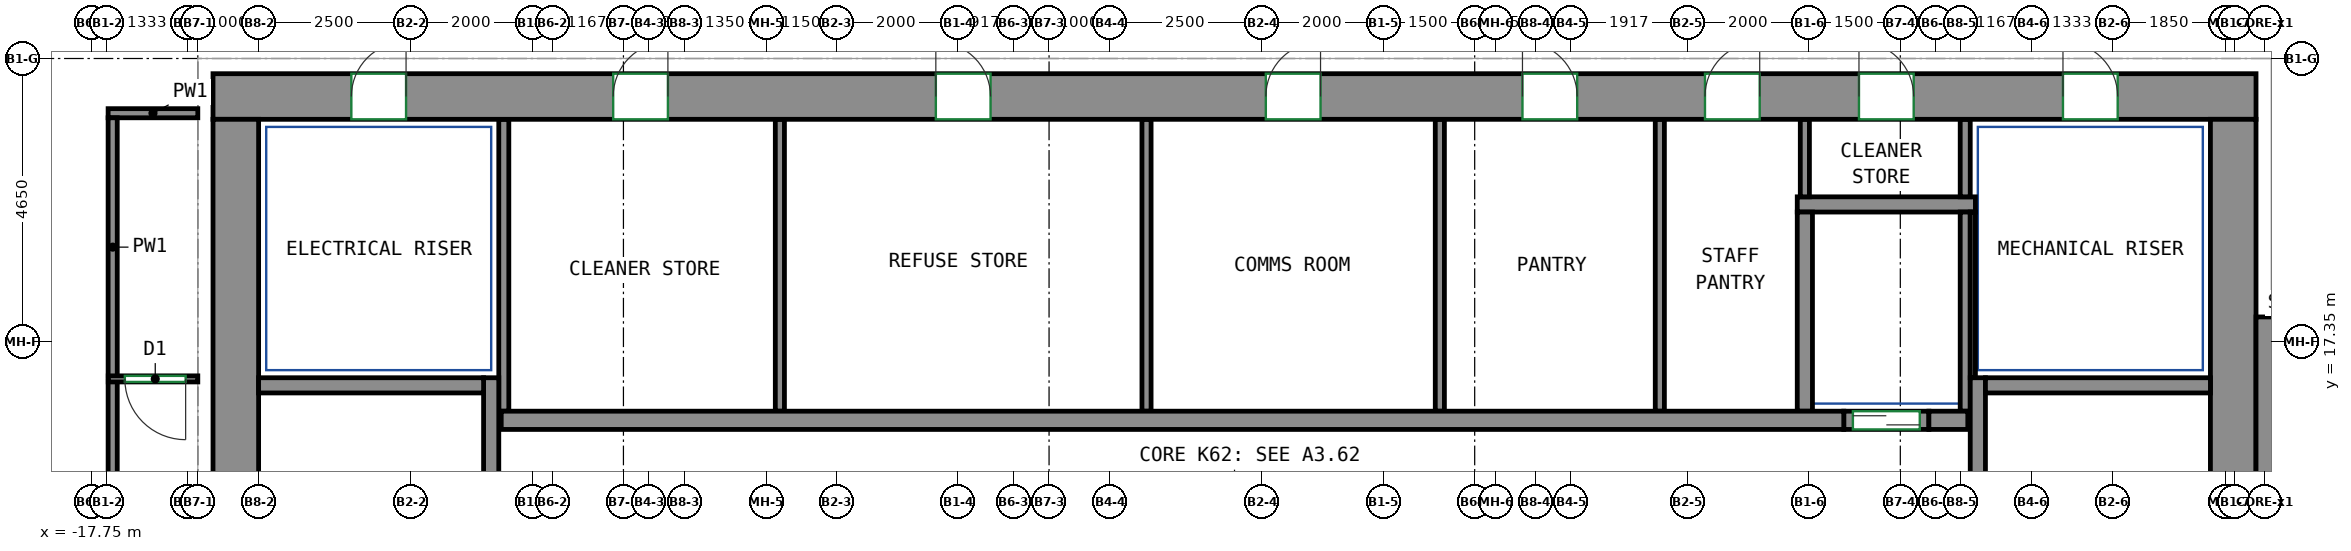
"""IFC4 building model, lengths in metres.
Left out: names, types, materials, properties, quantities, classifications, styles, units other than length and angle.
Written with IfcOpenShell. Run it as: python <this file> out.ifc"""

import sys

from ifc_helpers import new_model, si_unit, direction, frame, frame_2d, origin, place, context, subcontext, project, spatial, rectangle, extrude, source, transform, mapped, element, fill, save


model = new_model("IFC4")
c1 = context("Model", 3, precision=1e-05, world=origin(), true_north=direction((0.0, 1.0)))
c2 = subcontext(c1, "Body", "Model", "MODEL_VIEW")
j1 = project(units=[si_unit("LENGTHUNIT", "METRE"), si_unit("PLANEANGLEUNIT", "RADIAN")], contexts=[c1])
p1 = place(None, origin())
s1 = spatial("IfcSite", under=j1, at=p1, CompositionType="ELEMENT")
p2 = place(p1, origin())
s2 = spatial("IfcBuilding", under=s1, at=p2, CompositionType="ELEMENT")
p3 = place(p2, frame((0.0, 0.0, 252.6)))
s3 = spatial("IfcBuildingStorey", under=s2, at=p3, CompositionType="ELEMENT", Elevation=252.6)
m1 = source(origin(), c2, "Body", "SweptSolid", [
    extrude(rectangle(XDim=33.6, YDim=0.75, at=frame_2d((16.8, 0.0))), origin(), (0.0, 0.0, 1.0), 3.12),
])
p4 = place(p3, frame((-15.75, 21.375, 0.0), z_axis=(0.0, 0.0, 1.0), x_axis=(1.0, 0.0, 0.0)))
e1 = element("IfcWall", 1, at=p4, inside=s3, PredefinedType="SHEAR", context=c2, shape_type="MappedRepresentation", body=[
    mapped(m1, transform((0.0, 0.0, 0.0))),
])
p5 = place(p4, frame((6.581, 0.0, 0.0)))
e2 = element("IfcOpeningElement", 2, at=p5, cuts=e1, PredefinedType="OPENING", context=c2, shape_type="SweptSolid", body=[
    extrude(rectangle(XDim=0.9, YDim=2.1, at=frame_2d((0.45, 1.05))), frame((0.0, 0.385, 0.0), z_axis=(0.0, -1.0, 0.0), x_axis=(1.0, 0.0, 0.0)), (0.0, 0.0, 1.0), 0.77),
])
p6 = place(p4, frame((11.888, 0.0, 0.0)))
e3 = element("IfcOpeningElement", 3, at=p6, cuts=e1, PredefinedType="OPENING", context=c2, shape_type="SweptSolid", body=[
    extrude(rectangle(XDim=0.9, YDim=2.1, at=frame_2d((0.45, 1.05))), frame((0.0, 0.385, 0.0), z_axis=(0.0, -1.0, 0.0), x_axis=(1.0, 0.0, 0.0)), (0.0, 0.0, 1.0), 0.77),
])
p7 = place(p4, frame((17.315, 0.0, 0.0)))
e4 = element("IfcOpeningElement", 4, at=p7, cuts=e1, PredefinedType="OPENING", context=c2, shape_type="SweptSolid", body=[
    extrude(rectangle(XDim=0.9, YDim=2.1, at=frame_2d((0.45, 1.05))), frame((0.0, 0.385, 0.0), z_axis=(0.0, -1.0, 0.0), x_axis=(1.0, 0.0, 0.0)), (0.0, 0.0, 1.0), 0.77),
])
p8 = place(p4, frame((21.536, 0.0, 0.0)))
e5 = element("IfcOpeningElement", 5, at=p8, cuts=e1, PredefinedType="OPENING", context=c2, shape_type="SweptSolid", body=[
    extrude(rectangle(XDim=0.9, YDim=2.1, at=frame_2d((0.45, 1.05))), frame((0.0, 0.385, 0.0), z_axis=(0.0, -1.0, 0.0), x_axis=(1.0, 0.0, 0.0)), (0.0, 0.0, 1.0), 0.77),
])
p9 = place(p4, frame((24.537, 0.0, 0.0)))
e6 = element("IfcOpeningElement", 6, at=p9, cuts=e1, PredefinedType="OPENING", context=c2, shape_type="SweptSolid", body=[
    extrude(rectangle(XDim=0.9, YDim=2.1, at=frame_2d((0.45, 1.05))), frame((0.0, 0.385, 0.0), z_axis=(0.0, -1.0, 0.0), x_axis=(1.0, 0.0, 0.0)), (0.0, 0.0, 1.0), 0.77),
])
p10 = place(p4, frame((27.07, 0.0, 0.0)))
e7 = element("IfcOpeningElement", 7, at=p10, cuts=e1, PredefinedType="OPENING", context=c2, shape_type="SweptSolid", body=[
    extrude(rectangle(XDim=0.9, YDim=2.1, at=frame_2d((0.45, 1.05))), frame((0.0, 0.385, 0.0), z_axis=(0.0, -1.0, 0.0), x_axis=(1.0, 0.0, 0.0)), (0.0, 0.0, 1.0), 0.77),
])
p11 = place(p4, frame((2.275, 0.0, 0.0)))
e8 = element("IfcOpeningElement", 8, at=p11, cuts=e1, PredefinedType="OPENING", context=c2, shape_type="SweptSolid", body=[
    extrude(rectangle(XDim=0.9, YDim=2.1, at=frame_2d((0.45, 1.05))), frame((0.0, 0.385, 0.0), z_axis=(0.0, -1.0, 0.0), x_axis=(1.0, 0.0, 0.0)), (0.0, 0.0, 1.0), 0.77),
])
p12 = place(p4, frame((30.425, 0.0, 0.0)))
e9 = element("IfcOpeningElement", 9, at=p12, cuts=e1, PredefinedType="OPENING", context=c2, shape_type="SweptSolid", body=[
    extrude(rectangle(XDim=0.9, YDim=2.1, at=frame_2d((0.45, 1.05))), frame((0.0, 0.385, 0.0), z_axis=(0.0, -1.0, 0.0), x_axis=(1.0, 0.0, 0.0)), (0.0, 0.0, 1.0), 0.77),
])
m2 = source(origin(), c2, "Body", "SweptSolid", [
    extrude(rectangle(XDim=12.0, YDim=0.75, at=frame_2d((6.0, 0.0))), origin(), (0.0, 0.0, 1.0), 3.12),
])
for number, where, z_axis, x_axis in (
    (10, (-15.375, 9.0, 0.0), (0.0, 0.0, 1.0), (0.0, 1.0, 0.0)),
    (11, (17.475, 9.0, 0.0), (0.0, 0.0, 1.0), (0.0, 1.0, 0.0)),
):
    element("IfcWall", number, at=place(p3, frame(where, z_axis=z_axis, x_axis=x_axis)), inside=s3, PredefinedType="SHEAR", context=c2, shape_type="MappedRepresentation", body=[
        mapped(m2, transform((0.0, 0.0, 0.0))),
    ])
m3 = source(origin(), c2, "Body", "SweptSolid", [
    extrude(rectangle(XDim=7.75, YDim=0.25, at=frame_2d((3.875, 0.0))), origin(), (0.0, 0.0, 1.0), 3.12),
])
p13 = place(p3, frame((-11.175, 9.0, 0.0), z_axis=(0.0, 0.0, 1.0), x_axis=(0.0, 1.0, 0.0)))
e12 = element("IfcWall", 12, at=p13, inside=s3, PredefinedType="SHEAR", context=c2, shape_type="MappedRepresentation", body=[
    mapped(m3, transform((0.0, 0.0, 0.0))),
])
m4 = source(origin(), c2, "Body", "SweptSolid", [
    extrude(rectangle(XDim=3.7, YDim=0.25, at=frame_2d((1.85, 0.0))), origin(), (0.0, 0.0, 1.0), 3.12),
])
p14 = place(p3, frame((-15.0, 16.625, 0.0), z_axis=(0.0, 0.0, 1.0), x_axis=(1.0, 0.0, 0.0)))
e13 = element("IfcWall", 13, at=p14, inside=s3, PredefinedType="SHEAR", context=c2, shape_type="MappedRepresentation", body=[
    mapped(m4, transform((0.0, 0.0, 0.0))),
])
p15 = place(p3, frame((13.275, 9.0, 0.0), z_axis=(0.0, 0.0, 1.0), x_axis=(0.0, 1.0, 0.0)))
e14 = element("IfcWall", 14, at=p15, inside=s3, PredefinedType="SHEAR", context=c2, shape_type="MappedRepresentation", body=[
    mapped(m3, transform((0.0, 0.0, 0.0))),
])
m5 = source(origin(), c2, "Body", "SweptSolid", [
    extrude(rectangle(XDim=3.7, YDim=0.25, at=frame_2d((1.85, 0.0))), origin(), (0.0, 0.0, 1.0), 3.12),
])
p16 = place(p3, frame((13.4, 16.625, 0.0), z_axis=(0.0, 0.0, 1.0), x_axis=(1.0, 0.0, 0.0)))
e15 = element("IfcWall", 15, at=p16, inside=s3, PredefinedType="SHEAR", context=c2, shape_type="MappedRepresentation", body=[
    mapped(m5, transform((0.0, 0.0, 0.0))),
])
m6 = source(origin(), c2, "Body", "SweptSolid", [
    extrude(rectangle(XDim=8.0, YDim=0.5, at=frame_2d((4.0, 0.0))), origin(), (0.0, 0.0, 1.0), 3.12),
])
p17 = place(p3, frame((18.1, 9.75, 0.0), z_axis=(0.0, 0.0, 1.0), x_axis=(0.0, 1.0, 0.0)))
e16 = element("IfcWall", 16, at=p17, inside=s3, PredefinedType="SHEAR", context=c2, shape_type="MappedRepresentation", body=[
    mapped(m6, transform((0.0, 0.0, 0.0))),
])
m7 = source(origin(), c2, "Body", "SweptSolid", [
    extrude(rectangle(XDim=22.08, YDim=0.3, at=frame_2d((11.04, 0.0))), origin(), (0.0, 0.0, 1.0), 3.12),
])
p18 = place(p3, frame((-11.01, 16.05, 0.0), z_axis=(0.0, 0.0, 1.0), x_axis=(1.0, 0.0, 0.0)))
e17 = element("IfcWall", 17, at=p18, inside=s3, PredefinedType="SHEAR", context=c2, shape_type="MappedRepresentation", body=[
    mapped(m7, transform((0.0, 0.0, 0.0))),
])
m8 = source(origin(), c2, "Body", "SweptSolid", [
    extrude(rectangle(XDim=0.64, YDim=0.3, at=frame_2d((0.32, 0.0))), origin(), (0.0, 0.0, 1.0), 3.12),
])
p19 = place(p3, frame((12.47, 16.05, 0.0), z_axis=(0.0, 0.0, 1.0), x_axis=(1.0, 0.0, 0.0)))
e18 = element("IfcWall", 18, at=p19, inside=s3, PredefinedType="SHEAR", context=c2, shape_type="MappedRepresentation", body=[
    mapped(m8, transform((0.0, 0.0, 0.0))),
])
m9 = source(origin(), c2, "Body", "SweptSolid", [
    extrude(rectangle(XDim=1.4, YDim=0.3, at=frame_2d((0.7, 0.0))), origin(), (0.0, 0.0, 1.0), 3.12),
])
p20 = place(p3, frame((11.07, 16.05, 0.0), z_axis=(0.0, 0.0, 1.0), x_axis=(1.0, 0.0, 0.0)))
e19 = element("IfcWall", 19, at=p20, inside=s3, PredefinedType="PARTITIONING", context=c2, shape_type="MappedRepresentation", body=[
    mapped(m9, transform((0.0, 0.0, 0.0))),
])
p21 = place(p20, frame((0.15, 0.0, 0.0)))
e20 = element("IfcOpeningElement", 20, at=p21, cuts=e19, PredefinedType="OPENING", context=c2, shape_type="SweptSolid", body=[
    extrude(rectangle(XDim=1.1, YDim=2.1, at=frame_2d((0.55, 1.05))), frame((0.0, 0.16, 0.0), z_axis=(0.0, -1.0, 0.0), x_axis=(1.0, 0.0, 0.0)), (0.0, 0.0, 1.0), 0.32),
])
m10 = source(origin(), c2, "Body", "SweptSolid", [
    extrude(rectangle(XDim=2.93, YDim=0.25, at=frame_2d((1.465, 0.0))), origin(), (0.0, 0.0, 1.0), 3.12),
])
p22 = place(p3, frame((10.305, 19.6, 0.0), z_axis=(0.0, 0.0, 1.0), x_axis=(1.0, 0.0, 0.0)))
e21 = element("IfcWall", 21, at=p22, inside=s3, PredefinedType="PARTITIONING", context=c2, shape_type="MappedRepresentation", body=[
    mapped(m10, transform((0.0, 0.0, 0.0))),
])
m11 = source(origin(), c2, "Body", "SweptSolid", [
    extrude(rectangle(XDim=3.275, YDim=0.165, at=frame_2d((1.638, 0.0))), origin(), (0.0, 0.0, 1.0), 3.12),
])
p23 = place(p3, frame((13.067, 16.2, 0.0), z_axis=(0.0, 0.0, 1.0), x_axis=(0.0, 1.0, 0.0)))
e22 = element("IfcWall", 22, at=p23, inside=s3, PredefinedType="PARTITIONING", context=c2, shape_type="MappedRepresentation", body=[
    mapped(m11, transform((0.0, 0.0, 0.0))),
])
m12 = source(origin(), c2, "Body", "SweptSolid", [
    extrude(rectangle(XDim=1.275, YDim=0.165, at=frame_2d((0.637, 0.0))), origin(), (0.0, 0.0, 1.0), 3.12),
])
p24 = place(p3, frame((13.067, 19.725, 0.0), z_axis=(0.0, 0.0, 1.0), x_axis=(0.0, 1.0, 0.0)))
e23 = element("IfcWall", 23, at=p24, inside=s3, PredefinedType="PARTITIONING", context=c2, shape_type="MappedRepresentation", body=[
    mapped(m12, transform((0.0, 0.0, 0.0))),
])
m13 = source(origin(), c2, "Body", "SweptSolid", [
    extrude(rectangle(XDim=4.8, YDim=0.165, at=frame_2d((2.4, 0.0))), origin(), (0.0, 0.0, 1.0), 3.12),
])
p25 = place(p3, frame((-10.968, 16.2, 0.0), z_axis=(0.0, 0.0, 1.0), x_axis=(0.0, 1.0, 0.0)))
e24 = element("IfcWall", 24, at=p25, inside=s3, PredefinedType="PARTITIONING", context=c2, shape_type="MappedRepresentation", body=[
    mapped(m13, transform((0.0, 0.0, 0.0))),
])
m14 = source(origin(), c2, "Body", "SweptSolid", [
    extrude(rectangle(XDim=3.275, YDim=0.25, at=frame_2d((1.638, 0.0))), origin(), (0.0, 0.0, 1.0), 3.12),
])
p26 = place(p3, frame((10.43, 16.2, 0.0), z_axis=(0.0, 0.0, 1.0), x_axis=(0.0, 1.0, 0.0)))
e25 = element("IfcWall", 25, at=p26, inside=s3, PredefinedType="PARTITIONING", context=c2, shape_type="MappedRepresentation", body=[
    mapped(m14, transform((0.0, 0.0, 0.0))),
])
m15 = source(origin(), c2, "Body", "SweptSolid", [
    extrude(rectangle(XDim=2.725, YDim=0.085, at=frame_2d((1.363, 0.0))), origin(), (0.0, 0.0, 1.0), 3.12),
])
p27 = place(p3, frame((13.192, 16.75, 0.0), z_axis=(0.0, 0.0, 1.0), x_axis=(0.0, 1.0, 0.0)))
e26 = element("IfcWall", 26, at=p27, inside=s3, PredefinedType="PARTITIONING", context=c2, shape_type="MappedRepresentation", body=[
    mapped(m15, transform((0.0, 0.0, 0.0))),
])
m16 = source(origin(), c2, "Body", "SweptSolid", [
    extrude(rectangle(XDim=4.8, YDim=0.15, at=frame_2d((2.4, 0.0))), origin(), (0.0, 0.0, 1.0), 3.12),
])
for number, where, z_axis, x_axis in (
    (27, (-6.427, 16.2, 0.0), (0.0, 0.0, 1.0), (0.0, 1.0, 0.0)),
    (28, (-0.397, 16.2, 0.0), (0.0, 0.0, 1.0), (0.0, 1.0, 0.0)),
    (29, (4.427, 16.2, 0.0), (0.0, 0.0, 1.0), (0.0, 1.0, 0.0)),
    (30, (8.045, 16.2, 0.0), (0.0, 0.0, 1.0), (0.0, 1.0, 0.0)),
):
    element("IfcWall", number, at=place(p3, frame(where, z_axis=z_axis, x_axis=x_axis)), inside=s3, PredefinedType="PARTITIONING", context=c2, shape_type="MappedRepresentation", body=[
        mapped(m16, transform((0.0, 0.0, 0.0))),
    ])
m17 = source(origin(), c2, "Body", "SweptSolid", [
    extrude(rectangle(XDim=1.275, YDim=0.15, at=frame_2d((0.637, 0.0))), origin(), (0.0, 0.0, 1.0), 3.12),
])
p28 = place(p3, frame((10.43, 19.725, 0.0), z_axis=(0.0, 0.0, 1.0), x_axis=(0.0, 1.0, 0.0)))
e31 = element("IfcWall", 31, at=p28, inside=s3, PredefinedType="PARTITIONING", context=c2, shape_type="MappedRepresentation", body=[
    mapped(m17, transform((0.0, 0.0, 0.0))),
])
p29 = place(p3, frame((-17.4, 4.214, 0.0), z_axis=(0.0, 0.0, 1.0), x_axis=(0.0, 1.0, 0.0)))
e32 = element("IfcWall", 32, at=p29, inside=s3, PredefinedType="PARTITIONING", context=c2, shape_type="SweptSolid", body=[
    extrude(rectangle(XDim=12.477, YDim=0.15, at=frame_2d((6.238, 0.0))), origin(), (0.0, 0.0, 1.0), 3.12),
])
p30 = place(p3, frame((-17.475, 21.1, 0.0), z_axis=(0.0, 0.0, 1.0), x_axis=(1.0, 0.0, 0.0)))
e33 = element("IfcWall", 33, at=p30, inside=s3, PredefinedType="PARTITIONING", context=c2, shape_type="SweptSolid", body=[
    extrude(rectangle(XDim=1.475, YDim=0.15, at=frame_2d((0.738, 0.0))), origin(), (0.0, 0.0, 1.0), 3.12),
])
p31 = place(p3, frame((-17.4, 16.771, 0.0), z_axis=(0.0, 0.0, 1.0), x_axis=(0.0, 1.0, 0.0)))
e34 = element("IfcWall", 34, at=p31, inside=s3, PredefinedType="PARTITIONING", context=c2, shape_type="SweptSolid", body=[
    extrude(rectangle(XDim=4.254, YDim=0.15, at=frame_2d((2.127, 0.0))), origin(), (0.0, 0.0, 1.0), 3.12),
])
p32 = place(p3, frame((-16.0, 16.731, 0.0), z_axis=(0.0, 0.0, 1.0), x_axis=(-1.0, 0.0, 0.0)))
e35 = element("IfcWall", 35, at=p32, inside=s3, PredefinedType="PARTITIONING", context=c2, shape_type="SweptSolid", body=[
    extrude(rectangle(XDim=1.473, YDim=0.1, at=frame_2d((0.736, 0.0))), origin(), (0.0, 0.0, 1.0), 3.12),
])
p33 = place(p32, frame((0.2, 0.0, 0.0)))
e36 = element("IfcOpeningElement", 36, at=p33, cuts=e35, PredefinedType="OPENING", context=c2, shape_type="SweptSolid", body=[
    extrude(rectangle(XDim=1.0, YDim=2.1, at=frame_2d((0.5, 1.05))), frame((0.0, 0.06, 0.0), z_axis=(0.0, -1.0, 0.0), x_axis=(1.0, 0.0, 0.0)), (0.0, 0.0, 1.0), 0.12),
])
p34 = place(p21, origin())
e37 = element("IfcDoor", 37, at=p34, inside=s3, OperationType="DOUBLE_DOOR_SLIDING", PredefinedType="DOOR", context=c2, shape_type="SweptSolid", body=[
    extrude(rectangle(XDim=1.1, YDim=2.1, at=frame_2d((0.55, 1.05))), frame((0.0, 0.025, 0.0), z_axis=(0.0, -1.0, 0.0), x_axis=(1.0, 0.0, 0.0)), (0.0, 0.0, 1.0), 0.05),
])
fill(e20, e37)
p35 = place(p5, origin())
e38 = element("IfcDoor", 38, at=p35, inside=s3, OperationType="SINGLE_SWING_RIGHT", PredefinedType="DOOR", context=c2, shape_type="SweptSolid", body=[
    extrude(rectangle(XDim=0.9, YDim=2.1, at=frame_2d((0.45, 1.05))), frame((0.0, -0.23, 0.0), z_axis=(0.0, -1.0, 0.0), x_axis=(1.0, 0.0, 0.0)), (0.0, 0.0, 1.0), 0.05),
])
fill(e2, e38)
p36 = place(p6, origin())
e39 = element("IfcDoor", 39, at=p36, inside=s3, OperationType="SINGLE_SWING_LEFT", PredefinedType="DOOR", context=c2, shape_type="SweptSolid", body=[
    extrude(rectangle(XDim=0.9, YDim=2.1, at=frame_2d((0.45, 1.05))), frame((0.0, -0.23, 0.0), z_axis=(0.0, -1.0, 0.0), x_axis=(1.0, 0.0, 0.0)), (0.0, 0.0, 1.0), 0.05),
])
fill(e3, e39)
p37 = place(p7, origin())
e40 = element("IfcDoor", 40, at=p37, inside=s3, OperationType="SINGLE_SWING_RIGHT", PredefinedType="DOOR", context=c2, shape_type="SweptSolid", body=[
    extrude(rectangle(XDim=0.9, YDim=2.1, at=frame_2d((0.45, 1.05))), frame((0.0, -0.23, 0.0), z_axis=(0.0, -1.0, 0.0), x_axis=(1.0, 0.0, 0.0)), (0.0, 0.0, 1.0), 0.05),
])
fill(e4, e40)
p38 = place(p8, origin())
e41 = element("IfcDoor", 41, at=p38, inside=s3, OperationType="SINGLE_SWING_LEFT", PredefinedType="DOOR", context=c2, shape_type="SweptSolid", body=[
    extrude(rectangle(XDim=0.9, YDim=2.1, at=frame_2d((0.45, 1.05))), frame((0.0, -0.23, 0.0), z_axis=(0.0, -1.0, 0.0), x_axis=(1.0, 0.0, 0.0)), (0.0, 0.0, 1.0), 0.05),
])
fill(e5, e41)
p39 = place(p9, origin())
e42 = element("IfcDoor", 42, at=p39, inside=s3, OperationType="SINGLE_SWING_RIGHT", PredefinedType="DOOR", context=c2, shape_type="SweptSolid", body=[
    extrude(rectangle(XDim=0.9, YDim=2.1, at=frame_2d((0.45, 1.05))), frame((0.0, -0.23, 0.0), z_axis=(0.0, -1.0, 0.0), x_axis=(1.0, 0.0, 0.0)), (0.0, 0.0, 1.0), 0.05),
])
fill(e6, e42)
p40 = place(p10, origin())
e43 = element("IfcDoor", 43, at=p40, inside=s3, OperationType="SINGLE_SWING_LEFT", PredefinedType="DOOR", context=c2, shape_type="SweptSolid", body=[
    extrude(rectangle(XDim=0.9, YDim=2.1, at=frame_2d((0.45, 1.05))), frame((0.0, -0.23, 0.0), z_axis=(0.0, -1.0, 0.0), x_axis=(1.0, 0.0, 0.0)), (0.0, 0.0, 1.0), 0.05),
])
fill(e7, e43)
p41 = place(p11, origin())
e44 = element("IfcDoor", 44, at=p41, inside=s3, OperationType="SINGLE_SWING_RIGHT", PredefinedType="DOOR", context=c2, shape_type="SweptSolid", body=[
    extrude(rectangle(XDim=0.9, YDim=2.1, at=frame_2d((0.45, 1.05))), frame((0.0, -0.23, 0.0), z_axis=(0.0, -1.0, 0.0), x_axis=(1.0, 0.0, 0.0)), (0.0, 0.0, 1.0), 0.05),
])
fill(e8, e44)
p42 = place(p12, origin())
e45 = element("IfcDoor", 45, at=p42, inside=s3, OperationType="SINGLE_SWING_LEFT", PredefinedType="DOOR", context=c2, shape_type="SweptSolid", body=[
    extrude(rectangle(XDim=0.9, YDim=2.1, at=frame_2d((0.45, 1.05))), frame((0.0, -0.23, 0.0), z_axis=(0.0, -1.0, 0.0), x_axis=(1.0, 0.0, 0.0)), (0.0, 0.0, 1.0), 0.05),
])
fill(e9, e45)
p43 = place(p33, origin())
e46 = element("IfcDoor", 46, at=p43, inside=s3, OperationType="SINGLE_SWING_LEFT", PredefinedType="DOOR", context=c2, shape_type="SweptSolid", body=[
    extrude(rectangle(XDim=1.0, YDim=2.1, at=frame_2d((0.5, 1.05))), frame((0.0, 0.025, 0.0), z_axis=(0.0, -1.0, 0.0), x_axis=(1.0, 0.0, 0.0)), (0.0, 0.0, 1.0), 0.05),
])
fill(e36, e46)
save(model, sys.argv[1])
